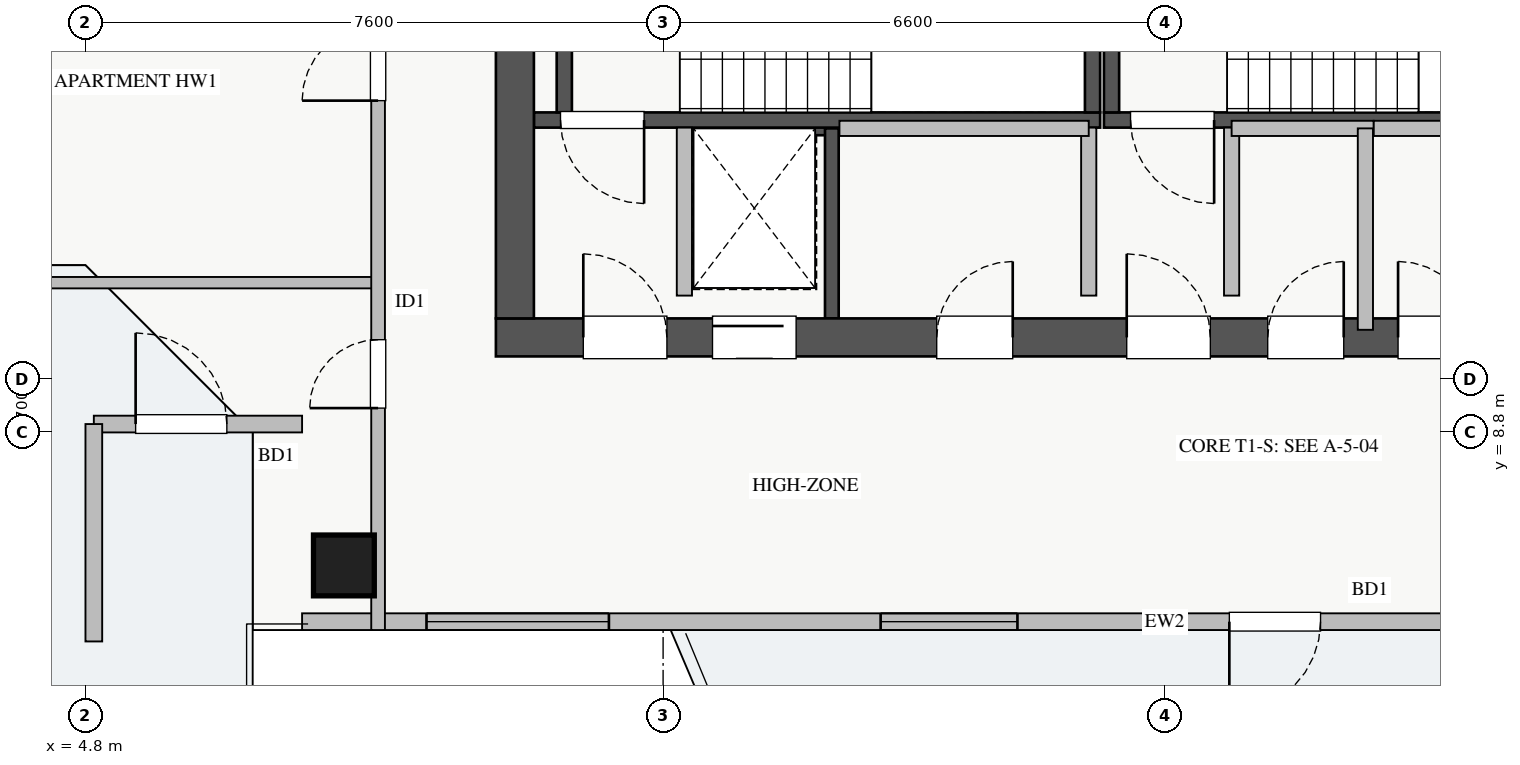
"""IFC4 building model, lengths in metres.
Left out: names, types, materials, properties, quantities, classifications, styles, units other than length and angle.
Written with IfcOpenShell. Run it as: python <this file> out.ifc"""

import sys

from ifc_helpers import new_model, si_unit, direction, frame, frame_2d, origin, origin_2d, place, context, subcontext, project, spatial, rectangle, extrude, source, transform, mapped, element, fill, save


model = new_model("IFC4")
c1 = context("Model", 3, precision=1e-05, world=origin(), true_north=direction((0.0, 1.0)))
c2 = subcontext(c1, "Body", "Model", "MODEL_VIEW")
j1 = project(units=[si_unit("LENGTHUNIT", "METRE"), si_unit("PLANEANGLEUNIT", "RADIAN")], contexts=[c1])
p1 = place(None, origin())
s1 = spatial("IfcSite", under=j1, at=p1, CompositionType="ELEMENT")
p2 = place(p1, origin())
s2 = spatial("IfcBuilding", under=s1, at=p2, CompositionType="ELEMENT")
p3 = place(p2, frame((0.0, 0.0, 193.75)))
s3 = spatial("IfcBuildingStorey", under=s2, at=p3, CompositionType="ELEMENT", Elevation=193.75)
p4 = place(p3, frame((12.68, 12.8, 0.0), z_axis=(0.0, 0.0, 1.0), x_axis=(1.0, 0.0, 0.0)))
e1 = element("IfcWall", 1, at=p4, inside=s3, PredefinedType="SHEAR", context=c2, shape_type="SweptSolid", body=[
    extrude(rectangle(XDim=1.94, YDim=0.18, at=frame_2d((0.97, 0.0))), origin(), (0.0, 0.0, 1.0), 3.07),
])
p5 = place(p3, frame((14.62, 10.3, 0.0), z_axis=(0.0, 0.0, 1.0), x_axis=(0.0, 1.0, 0.0)))
e2 = element("IfcWall", 2, at=p5, inside=s3, PredefinedType="SHEAR", context=c2, shape_type="SweptSolid", body=[
    extrude(rectangle(XDim=2.5, YDim=0.18, at=frame_2d((1.25, 0.0))), origin(), (0.0, 0.0, 1.0), 3.07),
])
p6 = place(p3, frame((10.7, 12.91, 0.0), z_axis=(0.0, 0.0, 1.0), x_axis=(1.0, 0.0, 0.0)))
e3 = element("IfcWall", 3, at=p6, inside=s3, PredefinedType="SHEAR", context=c2, shape_type="SweptSolid", body=[
    extrude(rectangle(XDim=7.45, YDim=0.2, at=frame_2d((3.725, 0.0))), origin(), (0.0, 0.0, 1.0), 3.25),
])
p7 = place(p6, frame((0.35, 0.0, 0.0)))
e4 = element("IfcOpeningElement", 4, at=p7, cuts=e3, PredefinedType="OPENING", context=c2, shape_type="SweptSolid", body=[
    extrude(rectangle(XDim=1.1, YDim=2.05, at=frame_2d((0.55, 1.025))), frame((0.0, 0.11, 0.0), z_axis=(0.0, -1.0, 0.0), x_axis=(1.0, 0.0, 0.0)), (0.0, 0.0, 1.0), 0.22),
])
for number, where, z_axis, x_axis in (
    (5, (11.1, 13.01, 0.0), (0.0, 0.0, 1.0), (0.0, 1.0, 0.0)),
    (6, (18.05, 13.01, 0.0), (0.0, 0.0, 1.0), (0.0, 1.0, 0.0)),
):
    element("IfcWall", number, at=place(p3, frame(where, z_axis=z_axis, x_axis=x_axis)), inside=s3, PredefinedType="SHEAR", context=c2, shape_type="SweptSolid", body=[
        extrude(rectangle(XDim=2.94, YDim=0.2, at=frame_2d((1.47, 0.0))), origin(), (0.0, 0.0, 1.0), 3.25),
    ])
p8 = place(p3, frame((18.2, 12.91, 0.0), z_axis=(0.0, 0.0, 1.0), x_axis=(1.0, 0.0, 0.0)))
e7 = element("IfcWall", 7, at=p8, inside=s3, PredefinedType="SHEAR", context=c2, shape_type="SweptSolid", body=[
    extrude(rectangle(XDim=7.15, YDim=0.2, at=frame_2d((3.575, 0.0))), origin(), (0.0, 0.0, 1.0), 3.25),
])
p9 = place(p8, frame((0.35, 0.0, 0.0)))
e8 = element("IfcOpeningElement", 8, at=p9, cuts=e7, PredefinedType="OPENING", context=c2, shape_type="SweptSolid", body=[
    extrude(rectangle(XDim=1.1, YDim=2.05, at=frame_2d((0.55, 1.025))), frame((0.0, 0.11, 0.0), z_axis=(0.0, -1.0, 0.0), x_axis=(1.0, 0.0, 0.0)), (0.0, 0.0, 1.0), 0.22),
])
p10 = place(p3, frame((18.3, 13.01, 0.0), z_axis=(0.0, 0.0, 1.0), x_axis=(0.0, 1.0, 0.0)))
e9 = element("IfcWall", 9, at=p10, inside=s3, PredefinedType="SHEAR", context=c2, shape_type="SweptSolid", body=[
    extrude(rectangle(XDim=2.94, YDim=0.2, at=frame_2d((1.47, 0.0))), origin(), (0.0, 0.0, 1.0), 3.25),
])
p11 = place(p3, frame((10.2, 10.05, 0.0), z_axis=(0.0, 0.0, 1.0), x_axis=(1.0, 0.0, 0.0)))
e10 = element("IfcWall", 10, at=p11, inside=s3, PredefinedType="SHEAR", context=c2, shape_type="SweptSolid", body=[
    extrude(rectangle(XDim=17.6, YDim=0.5, at=frame_2d((8.8, 0.0))), origin(), (0.0, 0.0, 1.0), 3.25),
])
p12 = place(p11, frame((1.15, 0.0, 0.0)))
e11 = element("IfcOpeningElement", 11, at=p12, cuts=e10, PredefinedType="OPENING", context=c2, shape_type="SweptSolid", body=[
    extrude(rectangle(XDim=1.1, YDim=2.05, at=frame_2d((0.55, 1.025))), frame((0.0, 0.26, 0.0), z_axis=(0.0, -1.0, 0.0), x_axis=(1.0, 0.0, 0.0)), (0.0, 0.0, 1.0), 0.52),
])
p13 = place(p11, frame((8.3, 0.0, 0.0)))
e12 = element("IfcOpeningElement", 12, at=p13, cuts=e10, PredefinedType="OPENING", context=c2, shape_type="SweptSolid", body=[
    extrude(rectangle(XDim=1.1, YDim=2.05, at=frame_2d((0.55, 1.025))), frame((0.0, 0.26, 0.0), z_axis=(0.0, -1.0, 0.0), x_axis=(1.0, 0.0, 0.0)), (0.0, 0.0, 1.0), 0.52),
])
p14 = place(p11, frame((2.85, 0.0, 0.0)))
e13 = element("IfcOpeningElement", 13, at=p14, cuts=e10, PredefinedType="OPENING", context=c2, shape_type="SweptSolid", body=[
    extrude(rectangle(XDim=1.1, YDim=2.05, at=frame_2d((0.55, 1.025))), frame((0.0, 0.26, 0.0), z_axis=(0.0, -1.0, 0.0), x_axis=(1.0, 0.0, 0.0)), (0.0, 0.0, 1.0), 0.52),
])
p15 = place(p11, frame((5.8, 0.0, 0.0)))
e14 = element("IfcOpeningElement", 14, at=p15, cuts=e10, PredefinedType="OPENING", context=c2, shape_type="SweptSolid", body=[
    extrude(rectangle(XDim=1.0, YDim=2.05, at=frame_2d((0.5, 1.025))), frame((0.0, 0.26, 0.0), z_axis=(0.0, -1.0, 0.0), x_axis=(1.0, 0.0, 0.0)), (0.0, 0.0, 1.0), 0.52),
])
p16 = place(p11, frame((14.74, 0.0, 0.0)))
e15 = element("IfcOpeningElement", 15, at=p16, cuts=e10, PredefinedType="OPENING", context=c2, shape_type="SweptSolid", body=[
    extrude(rectangle(XDim=1.0, YDim=2.05, at=frame_2d((0.5, 1.025))), frame((0.0, 0.26, 0.0), z_axis=(0.0, -1.0, 0.0), x_axis=(1.0, 0.0, 0.0)), (0.0, 0.0, 1.0), 0.52),
])
p17 = place(p11, frame((10.155, 0.0, 0.0)))
e16 = element("IfcOpeningElement", 16, at=p17, cuts=e10, PredefinedType="OPENING", context=c2, shape_type="SweptSolid", body=[
    extrude(rectangle(XDim=1.0, YDim=2.05, at=frame_2d((0.5, 1.025))), frame((0.0, 0.26, 0.0), z_axis=(0.0, -1.0, 0.0), x_axis=(1.0, 0.0, 0.0)), (0.0, 0.0, 1.0), 0.52),
])
p18 = place(p11, frame((11.87, 0.0, 0.0)))
e17 = element("IfcOpeningElement", 17, at=p18, cuts=e10, PredefinedType="OPENING", context=c2, shape_type="SweptSolid", body=[
    extrude(rectangle(XDim=1.0, YDim=2.05, at=frame_2d((0.5, 1.025))), frame((0.0, 0.26, 0.0), z_axis=(0.0, -1.0, 0.0), x_axis=(1.0, 0.0, 0.0)), (0.0, 0.0, 1.0), 0.52),
])
p19 = place(p11, frame((13.46, 0.0, 0.0)))
e18 = element("IfcOpeningElement", 18, at=p19, cuts=e10, PredefinedType="OPENING", context=c2, shape_type="SweptSolid", body=[
    extrude(rectangle(XDim=1.0, YDim=2.05, at=frame_2d((0.5, 1.025))), frame((0.0, 0.26, 0.0), z_axis=(0.0, -1.0, 0.0), x_axis=(1.0, 0.0, 0.0)), (0.0, 0.0, 1.0), 0.52),
])
p20 = place(p3, frame((10.45, 10.3, 0.0), z_axis=(0.0, 0.0, 1.0), x_axis=(0.0, 1.0, 0.0)))
e19 = element("IfcWall", 19, at=p20, inside=s3, PredefinedType="SHEAR", context=c2, shape_type="SweptSolid", body=[
    extrude(rectangle(XDim=6.2, YDim=0.5, at=frame_2d((3.1, 0.0))), origin(), (0.0, 0.0, 1.0), 3.25),
])
m1 = source(origin(), c2, "Body", "SweptSolid", [
    extrude(rectangle(XDim=0.8, YDim=0.8, at=origin_2d()), origin(), (0.0, 0.0, 1.0), 3.25),
])
p21 = place(p3, frame((8.2, 7.05, 0.0), z_axis=(0.0, 0.0, 1.0), x_axis=(1.0, 0.0, 0.0)))
e20 = element("IfcColumn", 20, at=p21, inside=s3, PredefinedType="COLUMN", context=c2, shape_type="MappedRepresentation", body=[
    mapped(m1, transform((0.0, 0.0, 0.0), x_axis=(1.0, 0.0, 0.0), y_axis=(0.0, 1.0, 0.0), z_axis=(0.0, 0.0, 1.0), scale=1.0)),
])
p22 = place(p3, frame((7.65, 6.31, 0.0), z_axis=(0.0, 0.0, 1.0), x_axis=(1.0, 0.0, 0.0)))
e21 = element("IfcWall", 21, at=p22, inside=s3, PredefinedType="STANDARD", context=c2, shape_type="SweptSolid", body=[
    extrude(rectangle(XDim=22.7, YDim=0.22, at=frame_2d((11.35, 0.0))), origin(), (0.0, 0.0, 1.0), 2.61),
])
p23 = place(p22, frame((12.2, 0.0, 0.0)))
e22 = element("IfcOpeningElement", 22, at=p23, cuts=e21, PredefinedType="OPENING", context=c2, shape_type="SweptSolid", body=[
    extrude(rectangle(XDim=1.2, YDim=2.1, at=frame_2d((0.6, 1.05))), frame((0.0, 0.12, 0.0), z_axis=(0.0, -1.0, 0.0), x_axis=(1.0, 0.0, 0.0)), (0.0, 0.0, 1.0), 0.24),
])
p24 = place(p22, frame((1.637, 0.0, 0.9)))
e23 = element("IfcOpeningElement", 23, at=p24, cuts=e21, PredefinedType="OPENING", context=c2, shape_type="SweptSolid", body=[
    extrude(rectangle(XDim=2.4, YDim=1.48, at=frame_2d((1.2, 0.74))), frame((0.0, 0.12, 0.0), z_axis=(0.0, -1.0, 0.0), x_axis=(1.0, 0.0, 0.0)), (0.0, 0.0, 1.0), 0.24),
])
p25 = place(p22, frame((7.612, 0.0, 0.9)))
e24 = element("IfcOpeningElement", 24, at=p25, cuts=e21, PredefinedType="OPENING", context=c2, shape_type="SweptSolid", body=[
    extrude(rectangle(XDim=1.8, YDim=1.45, at=frame_2d((0.9, 0.725))), frame((0.0, 0.12, 0.0), z_axis=(0.0, -1.0, 0.0), x_axis=(1.0, 0.0, 0.0)), (0.0, 0.0, 1.0), 0.24),
])
p26 = place(p22, frame((19.988, 0.0, 0.9)))
e25 = element("IfcOpeningElement", 25, at=p26, cuts=e21, PredefinedType="OPENING", context=c2, shape_type="SweptSolid", body=[
    extrude(rectangle(XDim=2.1, YDim=1.5, at=frame_2d((1.05, 0.75))), frame((0.0, 0.12, 0.0), z_axis=(0.0, -1.0, 0.0), x_axis=(1.0, 0.0, 0.0)), (0.0, 0.0, 1.0), 0.24),
])
p27 = place(p22, frame((16.27, 0.0, 0.9)))
e26 = element("IfcOpeningElement", 26, at=p27, cuts=e21, PredefinedType="OPENING", context=c2, shape_type="SweptSolid", body=[
    extrude(rectangle(XDim=2.4, YDim=1.5, at=frame_2d((1.2, 0.75))), frame((0.0, 0.12, 0.0), z_axis=(0.0, -1.0, 0.0), x_axis=(1.0, 0.0, 0.0)), (0.0, 0.0, 1.0), 0.24),
])
p28 = place(p3, frame((4.91, 8.91, 0.0), z_axis=(0.0, 0.0, 1.0), x_axis=(1.0, 0.0, 0.0)))
e27 = element("IfcWall", 27, at=p28, inside=s3, PredefinedType="STANDARD", context=c2, shape_type="SweptSolid", body=[
    extrude(rectangle(XDim=2.74, YDim=0.22, at=frame_2d((1.37, 0.0))), origin(), (0.0, 0.0, 1.0), 2.61),
])
p29 = place(p28, frame((0.55, 0.0, 0.0)))
e28 = element("IfcOpeningElement", 28, at=p29, cuts=e27, PredefinedType="OPENING", context=c2, shape_type="SweptSolid", body=[
    extrude(rectangle(XDim=1.2, YDim=2.1, at=frame_2d((0.6, 1.05))), frame((0.0, 0.12, 0.0), z_axis=(0.0, -1.0, 0.0), x_axis=(1.0, 0.0, 0.0)), (0.0, 0.0, 1.0), 0.24),
])
p30 = place(p3, frame((4.91, 6.05, 0.0), z_axis=(0.0, 0.0, 1.0), x_axis=(0.0, 1.0, 0.0)))
e29 = element("IfcWall", 29, at=p30, inside=s3, PredefinedType="STANDARD", context=c2, shape_type="SweptSolid", body=[
    extrude(rectangle(XDim=2.86, YDim=0.22, at=frame_2d((1.43, 0.0))), origin(), (0.0, 0.0, 1.0), 2.61),
])
for number, where, z_axis, x_axis in (
    (30, (12.68, 10.6, 0.0), (0.0, 0.0, 1.0), (0.0, 1.0, 0.0)),
    (31, (18.0, 10.6, 0.0), (0.0, 0.0, 1.0), (0.0, 1.0, 0.0)),
    (32, (19.88, 10.6, 0.0), (0.0, 0.0, 1.0), (0.0, 1.0, 0.0)),
):
    element("IfcWall", number, at=place(p3, frame(where, z_axis=z_axis, x_axis=x_axis)), inside=s3, PredefinedType="PARTITIONING", context=c2, shape_type="SweptSolid", body=[
        extrude(rectangle(XDim=2.21, YDim=0.2, at=frame_2d((1.105, 0.0))), origin(), (0.0, 0.0, 1.0), 3.07),
    ])
p31 = place(p3, frame((14.72, 12.8, 0.0), z_axis=(0.0, 0.0, 1.0), x_axis=(1.0, 0.0, 0.0)))
e33 = element("IfcWall", 33, at=p31, inside=s3, PredefinedType="PARTITIONING", context=c2, shape_type="SweptSolid", body=[
    extrude(rectangle(XDim=3.28, YDim=0.2, at=frame_2d((1.64, 0.0))), origin(), (0.0, 0.0, 1.0), 3.07),
])
p32 = place(p3, frame((19.88, 12.8, 0.0), z_axis=(0.0, 0.0, 1.0), x_axis=(1.0, 0.0, 0.0)))
e34 = element("IfcWall", 34, at=p32, inside=s3, PredefinedType="PARTITIONING", context=c2, shape_type="SweptSolid", body=[
    extrude(rectangle(XDim=1.87, YDim=0.2, at=frame_2d((0.935, 0.0))), origin(), (0.0, 0.0, 1.0), 3.07),
])
p33 = place(p3, frame((21.64, 10.15, 0.0), z_axis=(0.0, 0.0, 1.0), x_axis=(0.0, 1.0, 0.0)))
e35 = element("IfcWall", 35, at=p33, inside=s3, PredefinedType="PARTITIONING", context=c2, shape_type="SweptSolid", body=[
    extrude(rectangle(XDim=2.65, YDim=0.2, at=frame_2d((1.325, 0.0))), origin(), (0.0, 0.0, 1.0), 3.07),
])
p34 = place(p3, frame((21.75, 12.8, 0.0), z_axis=(0.0, 0.0, 1.0), x_axis=(1.0, 0.0, 0.0)))
e36 = element("IfcWall", 36, at=p34, inside=s3, PredefinedType="PARTITIONING", context=c2, shape_type="SweptSolid", body=[
    extrude(rectangle(XDim=5.17, YDim=0.2, at=frame_2d((2.585, 0.0))), origin(), (0.0, 0.0, 1.0), 3.07),
])
p35 = place(p3, frame((2.45, 10.77, 0.0), z_axis=(0.0, 0.0, 1.0), x_axis=(1.0, 0.0, 0.0)))
e37 = element("IfcWall", 37, at=p35, inside=s3, PredefinedType="PARTITIONING", context=c2, shape_type="SweptSolid", body=[
    extrude(rectangle(XDim=6.2, YDim=0.15, at=frame_2d((3.1, 0.0))), origin(), (0.0, 0.0, 1.0), 3.07),
])
p36 = place(p3, frame((8.65, 6.2, 0.0), z_axis=(0.0, 0.0, 1.0), x_axis=(0.0, 1.0, 0.0)))
e38 = element("IfcWall", 38, at=p36, inside=s3, PredefinedType="PARTITIONING", context=c2, shape_type="SweptSolid", body=[
    extrude(rectangle(XDim=33.6, YDim=0.18, at=frame_2d((16.8, 0.0))), origin(), (0.0, 0.0, 1.0), 3.07),
])
p37 = place(p36, frame((29.605, 0.0, 0.0)))
e39 = element("IfcOpeningElement", 39, at=p37, cuts=e38, PredefinedType="OPENING", context=c2, shape_type="SweptSolid", body=[
    extrude(rectangle(XDim=0.9, YDim=2.05, at=frame_2d((0.45, 1.025))), frame((0.0, 0.1, 0.0), z_axis=(0.0, -1.0, 0.0), x_axis=(1.0, 0.0, 0.0)), (0.0, 0.0, 1.0), 0.2),
])
p38 = place(p36, frame((2.92, 0.0, 0.0)))
e40 = element("IfcOpeningElement", 40, at=p38, cuts=e38, PredefinedType="OPENING", context=c2, shape_type="SweptSolid", body=[
    extrude(rectangle(XDim=0.9, YDim=2.05, at=frame_2d((0.45, 1.025))), frame((0.0, 0.1, 0.0), z_axis=(0.0, -1.0, 0.0), x_axis=(1.0, 0.0, 0.0)), (0.0, 0.0, 1.0), 0.2),
])
p39 = place(p36, frame((6.965, 0.0, 0.0)))
e41 = element("IfcOpeningElement", 41, at=p39, cuts=e38, PredefinedType="OPENING", context=c2, shape_type="SweptSolid", body=[
    extrude(rectangle(XDim=1.0, YDim=2.05, at=frame_2d((0.5, 1.025))), frame((0.0, 0.1, 0.0), z_axis=(0.0, -1.0, 0.0), x_axis=(1.0, 0.0, 0.0)), (0.0, 0.0, 1.0), 0.2),
])
p40 = place(p36, frame((18.595, 0.0, 0.0)))
e42 = element("IfcOpeningElement", 42, at=p40, cuts=e38, PredefinedType="OPENING", context=c2, shape_type="SweptSolid", body=[
    extrude(rectangle(XDim=1.0, YDim=2.05, at=frame_2d((0.5, 1.025))), frame((0.0, 0.1, 0.0), z_axis=(0.0, -1.0, 0.0), x_axis=(1.0, 0.0, 0.0)), (0.0, 0.0, 1.0), 0.2),
])
m2 = source(origin(), c2, "Body", "SweptSolid", [
    extrude(rectangle(XDim=1.2, YDim=2.1, at=frame_2d((0.6, 1.05))), frame((0.0, 0.025, 0.0), z_axis=(0.0, -1.0, 0.0), x_axis=(1.0, 0.0, 0.0)), (0.0, 0.0, 1.0), 0.05),
])
p41 = place(p23, frame((1.2, 0.0, 0.0), z_axis=(0.0, 0.0, 1.0), x_axis=(-1.0, 0.0, 0.0)))
e43 = element("IfcDoor", 43, at=p41, inside=s3, OperationType="SINGLE_SWING_LEFT", PredefinedType="DOOR", context=c2, shape_type="MappedRepresentation", body=[
    mapped(m2, transform((0.0, 0.0, 0.0), x_axis=(1.0, 0.0, 0.0), y_axis=(0.0, 1.0, 0.0), z_axis=(0.0, 0.0, 1.0), scale=1.0)),
])
fill(e22, e43)
m3 = source(origin(), c2, "Body", "SweptSolid", [
    extrude(rectangle(XDim=2.4, YDim=1.48, at=frame_2d((1.2, 0.74))), frame((0.0, 0.03, 0.0), z_axis=(0.0, -1.0, 0.0), x_axis=(1.0, 0.0, 0.0)), (0.0, 0.0, 1.0), 0.06),
])
p42 = place(p24, origin())
e44 = element("IfcWindow", 44, at=p42, inside=s3, PartitioningType="TRIPLE_PANEL_VERTICAL", PredefinedType="WINDOW", context=c2, shape_type="MappedRepresentation", body=[
    mapped(m3, transform((0.0, 0.0, 0.0), x_axis=(1.0, 0.0, 0.0), y_axis=(0.0, 1.0, 0.0), z_axis=(0.0, 0.0, 1.0), scale=1.0)),
])
fill(e23, e44)
m4 = source(origin(), c2, "Body", "SweptSolid", [
    extrude(rectangle(XDim=1.8, YDim=1.45, at=frame_2d((0.9, 0.725))), frame((0.0, 0.03, 0.0), z_axis=(0.0, -1.0, 0.0), x_axis=(1.0, 0.0, 0.0)), (0.0, 0.0, 1.0), 0.06),
])
p43 = place(p25, origin())
e45 = element("IfcWindow", 45, at=p43, inside=s3, PartitioningType="DOUBLE_PANEL_VERTICAL", PredefinedType="WINDOW", context=c2, shape_type="MappedRepresentation", body=[
    mapped(m4, transform((0.0, 0.0, 0.0), x_axis=(1.0, 0.0, 0.0), y_axis=(0.0, 1.0, 0.0), z_axis=(0.0, 0.0, 1.0), scale=1.0)),
])
fill(e24, e45)
p44 = place(p29, origin())
e46 = element("IfcDoor", 46, at=p44, inside=s3, OperationType="SINGLE_SWING_LEFT", PredefinedType="DOOR", context=c2, shape_type="MappedRepresentation", body=[
    mapped(m2, transform((0.0, 0.0, 0.0), x_axis=(1.0, 0.0, 0.0), y_axis=(0.0, 1.0, 0.0), z_axis=(0.0, 0.0, 1.0), scale=1.0)),
])
fill(e28, e46)
m5 = source(origin(), c2, "Body", "SweptSolid", [
    extrude(rectangle(XDim=1.1, YDim=2.05, at=frame_2d((0.55, 1.025))), frame((0.0, 0.025, 0.0), z_axis=(0.0, -1.0, 0.0), x_axis=(1.0, 0.0, 0.0)), (0.0, 0.0, 1.0), 0.05),
])
p45 = place(p12, origin())
e47 = element("IfcDoor", 47, at=p45, inside=s3, OperationType="SINGLE_SWING_LEFT", PredefinedType="DOOR", context=c2, shape_type="MappedRepresentation", body=[
    mapped(m5, transform((0.0, 0.0, 0.0), x_axis=(1.0, 0.0, 0.0), y_axis=(0.0, 1.0, 0.0), z_axis=(0.0, 0.0, 1.0), scale=1.0)),
])
fill(e11, e47)
p46 = place(p7, frame((1.1, 0.0, 0.0), z_axis=(0.0, 0.0, 1.0), x_axis=(-1.0, 0.0, 0.0)))
e48 = element("IfcDoor", 48, at=p46, inside=s3, OperationType="SINGLE_SWING_RIGHT", PredefinedType="DOOR", context=c2, shape_type="MappedRepresentation", body=[
    mapped(m5, transform((0.0, 0.0, 0.0), x_axis=(1.0, 0.0, 0.0), y_axis=(0.0, 1.0, 0.0), z_axis=(0.0, 0.0, 1.0), scale=1.0)),
])
fill(e4, e48)
p47 = place(p13, origin())
e49 = element("IfcDoor", 49, at=p47, inside=s3, OperationType="SINGLE_SWING_LEFT", PredefinedType="DOOR", context=c2, shape_type="MappedRepresentation", body=[
    mapped(m5, transform((0.0, 0.0, 0.0), x_axis=(1.0, 0.0, 0.0), y_axis=(0.0, 1.0, 0.0), z_axis=(0.0, 0.0, 1.0), scale=1.0)),
])
fill(e12, e49)
p48 = place(p9, frame((1.1, 0.0, 0.0), z_axis=(0.0, 0.0, 1.0), x_axis=(-1.0, 0.0, 0.0)))
e50 = element("IfcDoor", 50, at=p48, inside=s3, OperationType="SINGLE_SWING_RIGHT", PredefinedType="DOOR", context=c2, shape_type="MappedRepresentation", body=[
    mapped(m5, transform((0.0, 0.0, 0.0), x_axis=(1.0, 0.0, 0.0), y_axis=(0.0, 1.0, 0.0), z_axis=(0.0, 0.0, 1.0), scale=1.0)),
])
fill(e8, e50)
p49 = place(p14, origin())
e51 = element("IfcDoor", 51, at=p49, inside=s3, OperationType="SLIDING_TO_RIGHT", PredefinedType="DOOR", context=c2, shape_type="MappedRepresentation", body=[
    mapped(m5, transform((0.0, 0.0, 0.0), x_axis=(1.0, 0.0, 0.0), y_axis=(0.0, 1.0, 0.0), z_axis=(0.0, 0.0, 1.0), scale=1.0)),
])
fill(e13, e51)
m6 = source(origin(), c2, "Body", "SweptSolid", [
    extrude(rectangle(XDim=1.0, YDim=2.05, at=frame_2d((0.5, 1.025))), frame((0.0, 0.025, 0.0), z_axis=(0.0, -1.0, 0.0), x_axis=(1.0, 0.0, 0.0)), (0.0, 0.0, 1.0), 0.05),
])
p50 = place(p15, origin())
e52 = element("IfcDoor", 52, at=p50, inside=s3, OperationType="SINGLE_SWING_RIGHT", PredefinedType="DOOR", context=c2, shape_type="MappedRepresentation", body=[
    mapped(m6, transform((0.0, 0.0, 0.0), x_axis=(1.0, 0.0, 0.0), y_axis=(0.0, 1.0, 0.0), z_axis=(0.0, 0.0, 1.0), scale=1.0)),
])
fill(e14, e52)
p51 = place(p17, origin())
e53 = element("IfcDoor", 53, at=p51, inside=s3, OperationType="SINGLE_SWING_RIGHT", PredefinedType="DOOR", context=c2, shape_type="MappedRepresentation", body=[
    mapped(m6, transform((0.0, 0.0, 0.0), x_axis=(1.0, 0.0, 0.0), y_axis=(0.0, 1.0, 0.0), z_axis=(0.0, 0.0, 1.0), scale=1.0)),
])
fill(e16, e53)
p52 = place(p18, origin())
e54 = element("IfcDoor", 54, at=p52, inside=s3, OperationType="SINGLE_SWING_LEFT", PredefinedType="DOOR", context=c2, shape_type="MappedRepresentation", body=[
    mapped(m6, transform((0.0, 0.0, 0.0), x_axis=(1.0, 0.0, 0.0), y_axis=(0.0, 1.0, 0.0), z_axis=(0.0, 0.0, 1.0), scale=1.0)),
])
fill(e17, e54)
m7 = source(origin(), c2, "Body", "SweptSolid", [
    extrude(rectangle(XDim=0.9, YDim=2.05, at=frame_2d((0.45, 1.025))), frame((0.0, 0.025, 0.0), z_axis=(0.0, -1.0, 0.0), x_axis=(1.0, 0.0, 0.0)), (0.0, 0.0, 1.0), 0.05),
])
p53 = place(p38, origin())
e55 = element("IfcDoor", 55, at=p53, inside=s3, OperationType="SINGLE_SWING_LEFT", PredefinedType="DOOR", context=c2, shape_type="MappedRepresentation", body=[
    mapped(m7, transform((0.0, 0.0, 0.0), x_axis=(1.0, 0.0, 0.0), y_axis=(0.0, 1.0, 0.0), z_axis=(0.0, 0.0, 1.0), scale=1.0)),
])
fill(e40, e55)
p54 = place(p39, origin())
e56 = element("IfcDoor", 56, at=p54, inside=s3, OperationType="SINGLE_SWING_LEFT", PredefinedType="DOOR", context=c2, shape_type="MappedRepresentation", body=[
    mapped(m6, transform((0.0, 0.0, 0.0), x_axis=(1.0, 0.0, 0.0), y_axis=(0.0, 1.0, 0.0), z_axis=(0.0, 0.0, 1.0), scale=1.0)),
])
fill(e41, e56)
save(model, sys.argv[1])
